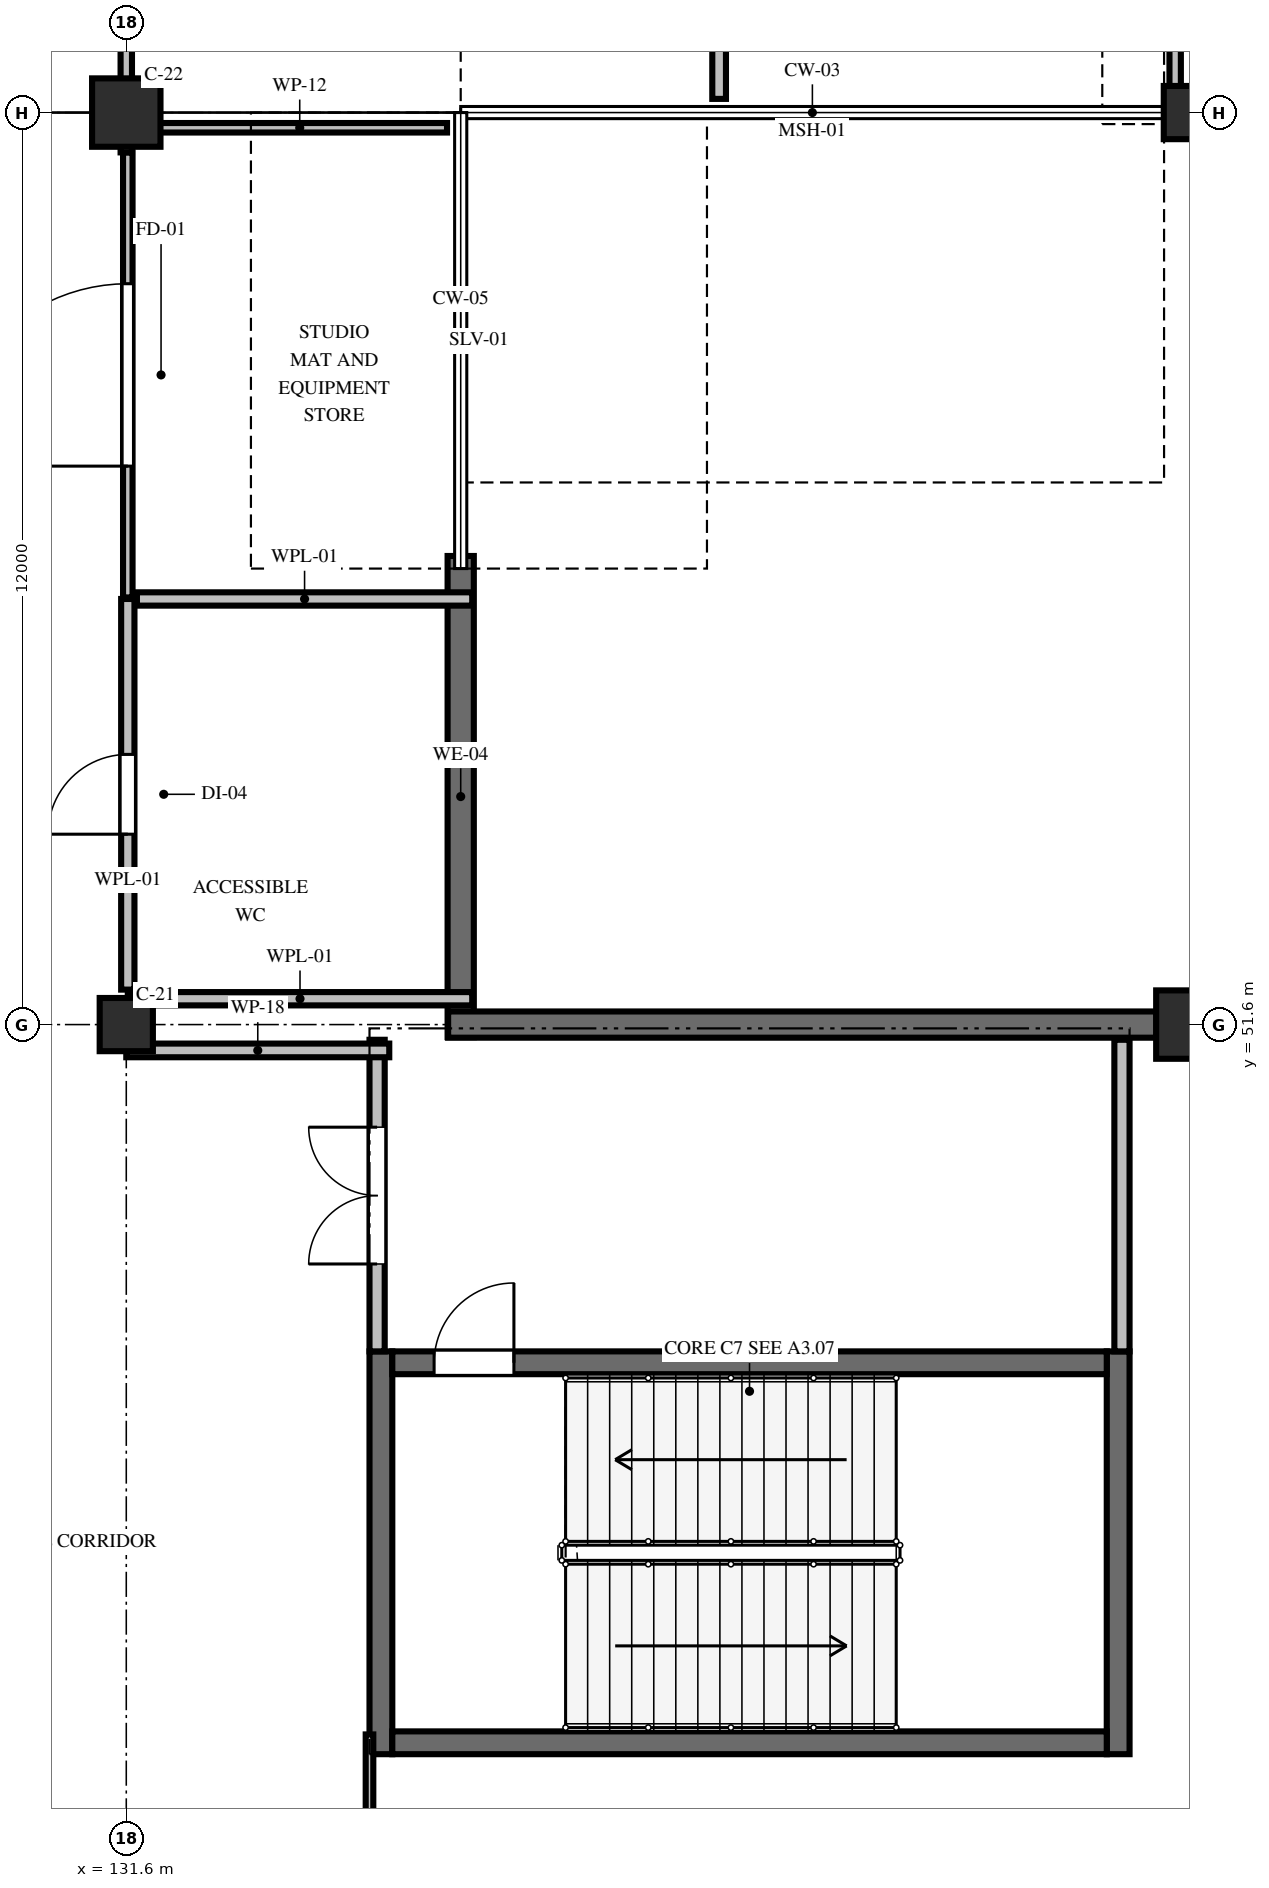
"""IFC4 building model, lengths in metres.
Left out: names, types, materials, properties, quantities, classifications, styles, units other than length and angle.
Written with IfcOpenShell. Run it as: python <this file> out.ifc"""

import sys

from ifc_helpers import new_model, si_unit, direction, frame, frame_2d, origin, origin_2d, place, context, subcontext, project, spatial, rectangle, hollow_rectangle, extrude, element, fill, save


model = new_model("IFC4")
c1 = context("Model", 3, precision=1e-05, world=origin(), true_north=direction((0.0, 1.0)))
c2 = subcontext(c1, "Body", "Model", "MODEL_VIEW")
j1 = project(units=[si_unit("LENGTHUNIT", "METRE"), si_unit("PLANEANGLEUNIT", "RADIAN")], contexts=[c1])
p1 = place(None, origin())
s1 = spatial("IfcSite", under=j1, at=p1, CompositionType="ELEMENT")
p2 = place(p1, origin())
s2 = spatial("IfcBuilding", under=s1, at=p2, CompositionType="ELEMENT")
p3 = place(p2, frame((0.0, 0.0, 5.4)))
s3 = spatial("IfcBuildingStorey", under=s2, at=p3, CompositionType="ELEMENT", Elevation=5.4)
p4 = place(p3, frame((131.6, 51.6, 0.0), z_axis=(0.0, 0.0, 1.0), x_axis=(1.0, 0.0, 0.0)))
e1 = element("IfcColumn", 1, at=p4, inside=s3, PredefinedType="COLUMN", context=c2, shape_type="SweptSolid", body=[
    extrude(hollow_rectangle(XDim=0.7, YDim=0.7, WallThickness=0.028, InnerFilletRadius=0.028, OuterFilletRadius=0.056, at=origin_2d()), origin(), (0.0, 0.0, 1.0), 5.4),
])
for number, where, z_axis, x_axis in (
    (2, (131.6, 63.6, 0.0), (0.0, 0.0, 1.0), (1.0, 0.0, 0.0)),
    (3, (145.6, 51.6, 0.0), (0.0, 0.0, 1.0), (1.0, 0.0, 0.0)),
):
    element("IfcColumn", number, at=place(p3, frame(where, z_axis=z_axis, x_axis=x_axis)), inside=s3, PredefinedType="COLUMN", context=c2, shape_type="SweptSolid", body=[
        extrude(hollow_rectangle(XDim=0.9, YDim=0.9, WallThickness=0.036, InnerFilletRadius=0.036, OuterFilletRadius=0.072, at=origin_2d()), origin(), (0.0, 0.0, 1.0), 5.4),
    ])
p5 = place(p3, frame((145.6, 63.6, 0.0), z_axis=(0.0, 0.0, 1.0), x_axis=(1.0, 0.0, 0.0)))
e4 = element("IfcColumn", 4, at=p5, inside=s3, PredefinedType="COLUMN", context=c2, shape_type="SweptSolid", body=[
    extrude(hollow_rectangle(XDim=0.7, YDim=0.7, WallThickness=0.028, InnerFilletRadius=0.028, OuterFilletRadius=0.056, at=origin_2d()), origin(), (0.0, 0.0, 1.0), 5.4),
])
p6 = place(p3, frame((136.0, 57.766, 0.0), z_axis=(0.0, 0.0, 1.0), x_axis=(0.0, -1.0, 0.0)))
e5 = element("IfcWall", 5, at=p6, inside=s3, PredefinedType="SOLIDWALL", context=c2, shape_type="SweptSolid", body=[
    extrude(rectangle(XDim=6.331, YDim=0.345, at=frame_2d((3.166, 0.0))), origin(), (0.0, 0.0, 1.0), 3.468),
])
p7 = place(p3, frame((135.834, 51.6, 0.0), z_axis=(0.0, 0.0, 1.0), x_axis=(1.0, 0.0, 0.0)))
e6 = element("IfcWall", 6, at=p7, inside=s3, PredefinedType="SOLIDWALL", context=c2, shape_type="SweptSolid", body=[
    extrude(rectangle(XDim=9.32, YDim=0.345, at=frame_2d((4.66, 0.0))), origin(), (0.0, 0.0, 1.0), 3.468),
])
for number, where, z_axis, x_axis in (
    (7, (134.95, 42.0, 0.0), (0.0, 0.0, 1.0), (0.0, 1.0, 0.0)),
    (8, (144.65, 47.3, 0.0), (0.0, 0.0, 1.0), (0.0, -1.0, 0.0)),
):
    element("IfcWall", number, at=place(p3, frame(where, z_axis=z_axis, x_axis=x_axis)), inside=s3, PredefinedType="SHEAR", context=c2, shape_type="SweptSolid", body=[
        extrude(rectangle(XDim=5.3, YDim=0.3, at=frame_2d((2.65, 0.0))), origin(), (0.0, 0.0, 1.0), 5.15),
    ])
p8 = place(p3, frame((144.5, 42.15, 0.0), z_axis=(0.0, 0.0, 1.0), x_axis=(-1.0, 0.0, 0.0)))
e9 = element("IfcWall", 9, at=p8, inside=s3, PredefinedType="SHEAR", context=c2, shape_type="SweptSolid", body=[
    extrude(rectangle(XDim=9.4, YDim=0.3, at=frame_2d((4.7, 0.0))), origin(), (0.0, 0.0, 1.0), 5.15),
])
p9 = place(p3, frame((135.1, 47.15, 0.0), z_axis=(0.0, 0.0, 1.0), x_axis=(1.0, 0.0, 0.0)))
e10 = element("IfcWall", 10, at=p9, inside=s3, PredefinedType="SHEAR", context=c2, shape_type="SweptSolid", body=[
    extrude(rectangle(XDim=9.4, YDim=0.3, at=frame_2d((4.7, 0.0))), origin(), (0.0, 0.0, 1.0), 5.15),
])
p10 = place(p9, frame((0.55, 0.0, 0.0)))
e11 = element("IfcOpeningElement", 11, at=p10, cuts=e10, PredefinedType="OPENING", context=c2, shape_type="SweptSolid", body=[
    extrude(rectangle(XDim=1.05, YDim=2.2, at=frame_2d((0.525, 1.1))), frame((0.0, 0.16, 0.0), z_axis=(0.0, -1.0, 0.0), x_axis=(1.0, 0.0, 0.0)), (0.0, 0.0, 1.0), 0.32),
])
p11 = place(p3, frame((134.9, 47.3, 0.0), z_axis=(0.0, 0.0, 1.0), x_axis=(0.0, 1.0, 0.0)))
e12 = element("IfcWall", 12, at=p11, inside=s3, PredefinedType="SOLIDWALL", context=c2, shape_type="SweptSolid", body=[
    extrude(rectangle(XDim=4.1, YDim=0.2, at=frame_2d((2.05, 0.0))), origin(), (0.0, 0.0, 1.0), 5.05),
])
p12 = place(p11, frame((1.15, 0.0, 0.0)))
e13 = element("IfcOpeningElement", 13, at=p12, cuts=e12, PredefinedType="OPENING", context=c2, shape_type="SweptSolid", body=[
    extrude(rectangle(XDim=1.8, YDim=2.2, at=frame_2d((0.9, 1.1))), frame((0.0, 0.11, 0.0), z_axis=(0.0, -1.0, 0.0), x_axis=(1.0, 0.0, 0.0)), (0.0, 0.0, 1.0), 0.22),
])
p13 = place(p3, frame((144.7, 47.3, 0.0), z_axis=(0.0, 0.0, 1.0), x_axis=(0.0, 1.0, 0.0)))
e14 = element("IfcWall", 14, at=p13, inside=s3, PredefinedType="SOLIDWALL", context=c2, shape_type="SweptSolid", body=[
    extrude(rectangle(XDim=4.1, YDim=0.2, at=frame_2d((2.05, 0.0))), origin(), (0.0, 0.0, 1.0), 5.05),
])
p14 = place(p3, frame((145.4, 78.4, 0.0), z_axis=(0.0, 0.0, 1.0), x_axis=(0.0, -1.0, 0.0)))
e15 = element("IfcWall", 15, at=p14, inside=s3, PredefinedType="PARTITIONING", context=c2, shape_type="SweptSolid", body=[
    extrude(rectangle(XDim=14.568, YDim=0.15, at=frame_2d((7.284, 0.0))), origin(), (0.0, 0.0, 1.0), 3.47),
])
p15 = place(p3, frame((139.4, 63.78, 0.0), z_axis=(0.0, 0.0, 1.0), x_axis=(0.0, 1.0, 0.0)))
e16 = element("IfcWall", 16, at=p15, inside=s3, PredefinedType="PARTITIONING", context=c2, shape_type="SweptSolid", body=[
    extrude(rectangle(XDim=6.8, YDim=0.18, at=frame_2d((3.4, 0.0))), origin(), (0.0, 0.0, 1.0), 3.47),
])
p16 = place(p3, frame((136.152, 51.94, 0.0), z_axis=(0.0, 0.0, 1.0), x_axis=(-1.0, 0.0, 0.0)))
e17 = element("IfcWall", 17, at=p16, inside=s3, PredefinedType="PLUMBINGWALL", context=c2, shape_type="SweptSolid", body=[
    extrude(rectangle(XDim=4.531, YDim=0.175, at=frame_2d((2.266, 0.0))), origin(), (0.0, 0.0, 1.0), 3.47),
])
p17 = place(p3, frame((131.62, 52.06, 0.0), z_axis=(0.0, 0.0, 1.0), x_axis=(0.0, 1.0, 0.0)))
e18 = element("IfcWall", 18, at=p17, inside=s3, PredefinedType="PLUMBINGWALL", context=c2, shape_type="SweptSolid", body=[
    extrude(rectangle(XDim=5.14, YDim=0.175, at=frame_2d((2.57, 0.0))), origin(), (0.0, 0.0, 1.0), 3.47),
])
p18 = place(p17, frame((2.045, 0.0, 0.0)))
e19 = element("IfcOpeningElement", 19, at=p18, cuts=e18, PredefinedType="OPENING", context=c2, shape_type="SweptSolid", body=[
    extrude(rectangle(XDim=1.05, YDim=2.15, at=frame_2d((0.525, 1.075))), frame((0.0, 0.097, 0.0), z_axis=(0.0, -1.0, 0.0), x_axis=(1.0, 0.0, 0.0)), (0.0, 0.0, 1.0), 0.195),
])
p19 = place(p3, frame((131.74, 57.2, 0.0), z_axis=(0.0, 0.0, 1.0), x_axis=(1.0, 0.0, 0.0)))
e20 = element("IfcWall", 20, at=p19, inside=s3, PredefinedType="PLUMBINGWALL", context=c2, shape_type="SweptSolid", body=[
    extrude(rectangle(XDim=4.412, YDim=0.175, at=frame_2d((2.206, 0.0))), origin(), (0.0, 0.0, 1.0), 4.178),
])
p20 = place(p3, frame((131.62, 57.22, 0.0), z_axis=(0.0, 0.0, 1.0), x_axis=(0.0, 1.0, 0.0)))
e21 = element("IfcWall", 21, at=p20, inside=s3, PredefinedType="PARTITIONING", context=c2, shape_type="SweptSolid", body=[
    extrude(rectangle(XDim=5.856, YDim=0.125, at=frame_2d((2.928, 0.0))), origin(), (0.0, 0.0, 1.0), 4.178),
])
p21 = place(p20, frame((1.728, 0.0, 0.0)))
e22 = element("IfcOpeningElement", 22, at=p21, cuts=e21, PredefinedType="OPENING", context=c2, shape_type="SweptSolid", body=[
    extrude(rectangle(XDim=2.4, YDim=2.3, at=frame_2d((1.2, 1.15))), frame((0.0, 0.073, 0.0), z_axis=(0.0, -1.0, 0.0), x_axis=(1.0, 0.0, 0.0)), (0.0, 0.0, 1.0), 0.145),
])
p22 = place(p3, frame((131.944, 63.4, 0.0), z_axis=(0.0, 0.0, 1.0), x_axis=(1.0, 0.0, 0.0)))
e23 = element("IfcWall", 23, at=p22, inside=s3, PredefinedType="PARTITIONING", context=c2, shape_type="SweptSolid", body=[
    extrude(rectangle(XDim=3.876, YDim=0.125, at=frame_2d((1.938, 0.0))), origin(), (0.0, 0.0, 1.0), 3.47),
])
p23 = place(p3, frame((131.6, 70.48, 0.0), z_axis=(0.0, 0.0, 1.0), x_axis=(0.0, -1.0, 0.0)))
e24 = element("IfcWall", 24, at=p23, inside=s3, PredefinedType="PARTITIONING", context=c2, shape_type="SweptSolid", body=[
    extrude(rectangle(XDim=7.404, YDim=0.15, at=frame_2d((3.702, 0.0))), origin(), (0.0, 0.0, 1.0), 3.47),
])
p24 = place(p3, frame((131.6, 51.26, 0.0), z_axis=(0.0, 0.0, 1.0), x_axis=(1.0, 0.0, 0.0)))
e25 = element("IfcWall", 25, at=p24, inside=s3, PredefinedType="PARTITIONING", context=c2, shape_type="SweptSolid", body=[
    extrude(rectangle(XDim=3.46, YDim=0.18, at=frame_2d((1.73, 0.0))), origin(), (0.0, 0.0, 1.0), 3.47),
])
p25 = place(p3, frame((134.8, 42.26, 0.0), z_axis=(0.0, 0.0, 1.0), x_axis=(0.0, -1.0, 0.0)))
e26 = element("IfcWall", 26, at=p25, inside=s3, PredefinedType="PARTITIONING", context=c2, shape_type="SweptSolid", body=[
    extrude(rectangle(XDim=5.86, YDim=0.1, at=frame_2d((2.93, 0.0))), origin(), (0.0, 0.0, 1.0), 3.47),
])
p26 = place(p10, origin())
e27 = element("IfcDoor", 27, at=p26, inside=s3, OperationType="SINGLE_SWING_RIGHT", PredefinedType="DOOR", context=c2, shape_type="SweptSolid", body=[
    extrude(rectangle(XDim=1.05, YDim=2.2, at=frame_2d((0.525, 1.1))), frame((0.0, 0.025, 0.0), z_axis=(0.0, -1.0, 0.0), x_axis=(1.0, 0.0, 0.0)), (0.0, 0.0, 1.0), 0.05),
])
fill(e11, e27)
p27 = place(p12, origin())
e28 = element("IfcDoor", 28, at=p27, inside=s3, OperationType="DOUBLE_DOOR_SINGLE_SWING", PredefinedType="DOOR", context=c2, shape_type="SweptSolid", body=[
    extrude(rectangle(XDim=1.8, YDim=2.2, at=frame_2d((0.9, 1.1))), frame((0.0, 0.025, 0.0), z_axis=(0.0, -1.0, 0.0), x_axis=(1.0, 0.0, 0.0)), (0.0, 0.0, 1.0), 0.05),
])
fill(e13, e28)
p28 = place(p21, origin())
e29 = element("IfcDoor", 29, at=p28, inside=s3, OperationType="FOLDING_TO_LEFT", PredefinedType="DOOR", context=c2, shape_type="SweptSolid", body=[
    extrude(rectangle(XDim=2.4, YDim=2.3, at=frame_2d((1.2, 1.15))), frame((0.0, 0.025, 0.0), z_axis=(0.0, -1.0, 0.0), x_axis=(1.0, 0.0, 0.0)), (0.0, 0.0, 1.0), 0.05),
])
fill(e22, e29)
p29 = place(p18, origin())
e30 = element("IfcDoor", 30, at=p29, inside=s3, OperationType="SINGLE_SWING_LEFT", PredefinedType="DOOR", context=c2, shape_type="SweptSolid", body=[
    extrude(rectangle(XDim=1.05, YDim=2.15, at=frame_2d((0.525, 1.075))), frame((0.0, 0.025, 0.0), z_axis=(0.0, -1.0, 0.0), x_axis=(1.0, 0.0, 0.0)), (0.0, 0.0, 1.0), 0.05),
])
fill(e19, e30)
save(model, sys.argv[1])
